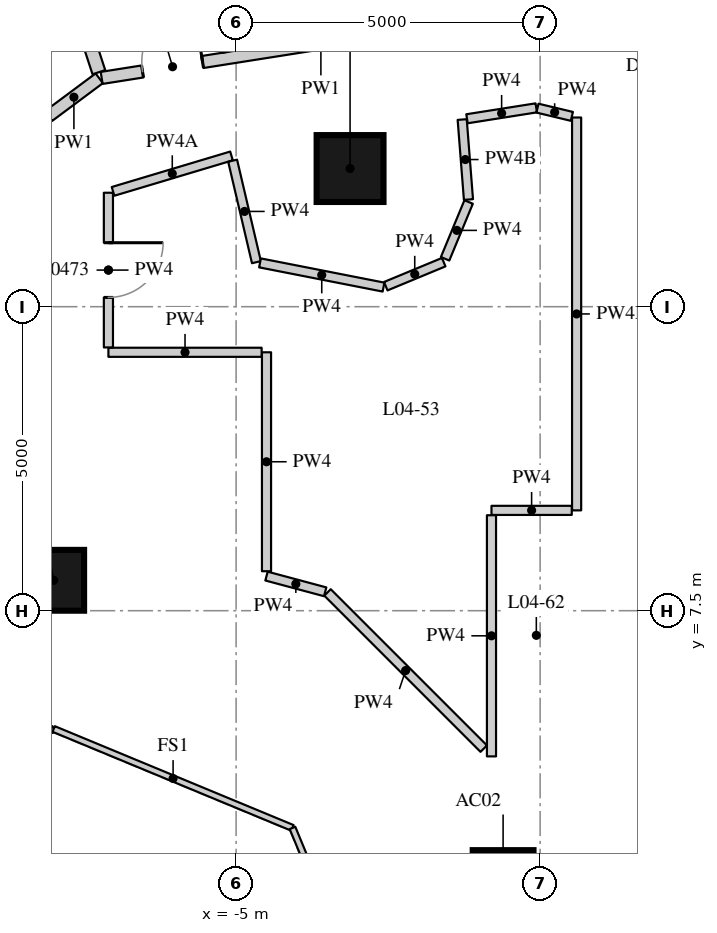
"""IFC4 building model, lengths in metres.
Left out: names, types, materials, properties, quantities, classifications, styles, units other than length and angle.
Written with IfcOpenShell. Run it as: python <this file> out.ifc"""

import sys

from ifc_helpers import new_model, si_unit, direction, frame, frame_2d, origin, origin_2d, place, context, subcontext, project, spatial, rectangle, extrude, element, fill, save


model = new_model("IFC4")
c1 = context("Model", 3, precision=1e-05, world=origin(), true_north=direction((0.0, 1.0)))
c2 = subcontext(c1, "Body", "Model", "MODEL_VIEW")
j1 = project(units=[si_unit("LENGTHUNIT", "METRE"), si_unit("PLANEANGLEUNIT", "RADIAN")], contexts=[c1])
p1 = place(None, origin())
s1 = spatial("IfcSite", under=j1, at=p1, CompositionType="ELEMENT")
p2 = place(p1, origin())
s2 = spatial("IfcBuilding", under=s1, at=p2, CompositionType="ELEMENT")
p3 = place(p2, frame((0.0, 0.0, 21.7)))
s3 = spatial("IfcBuildingStorey", under=s2, at=p3, CompositionType="ELEMENT", Elevation=21.7)
for number, where, z_axis, x_axis in (
    (1, (-0.609, 3.062, 0.0), (0.0, 0.0, 1.0), (1.0, 0.0, 0.0)),
    (2, (-8.0, 8.0, 0.0), (0.0, 0.0, 1.0), (1.0, 0.0, 0.0)),
):
    element("IfcColumn", number, at=place(p3, frame(where, z_axis=z_axis, x_axis=x_axis)), inside=s3, PredefinedType="COLUMN", context=c2, shape_type="SweptSolid", body=[
        extrude(rectangle(XDim=1.0, YDim=1.0, at=origin_2d()), origin(), (0.0, 0.0, 1.0), 3.3),
    ])
p4 = place(p3, frame((-3.126, 14.772, 0.0), z_axis=(0.0, 0.0, 1.0), x_axis=(1.0, 0.0, 0.0)))
e3 = element("IfcColumn", 3, at=p4, inside=s3, PredefinedType="COLUMN", context=c2, shape_type="SweptSolid", body=[
    extrude(rectangle(XDim=1.1, YDim=1.1, at=origin_2d()), origin(), (0.0, 0.0, 1.0), 3.3),
])
p5 = place(p3, frame((-8.084, 15.636, 0.0), z_axis=(0.0, 0.0, 1.0), x_axis=(0.802193962144, 0.597063520155, 0.0)))
e4 = element("IfcWall", 4, at=p5, inside=s3, PredefinedType="PARTITIONING", context=c2, shape_type="SweptSolid", body=[
    extrude(rectangle(XDim=1.039, YDim=0.2, at=frame_2d((0.52, 0.0))), origin(), (0.0, 0.0, 1.0), 3.02),
])
p6 = place(p3, frame((-7.211, 16.263, 0.0), z_axis=(0.0, 0.0, 1.0), x_axis=(0.987792503573, 0.155775382796, 0.0)))
e5 = element("IfcWall", 5, at=p6, inside=s3, PredefinedType="PARTITIONING", context=c2, shape_type="SweptSolid", body=[
    extrude(rectangle(XDim=7.3, YDim=0.2, at=frame_2d((3.65, 0.0))), origin(), (0.0, 0.0, 1.0), 3.02),
])
p7 = place(p6, frame((5.581, 0.0, 0.0)))
e6 = element("IfcOpeningElement", 6, at=p7, cuts=e5, PredefinedType="OPENING", context=c2, shape_type="SweptSolid", body=[
    extrude(rectangle(XDim=1.0, YDim=2.1, at=frame_2d((0.5, 1.05))), frame((0.0, 0.11, 0.0), z_axis=(0.0, -1.0, 0.0), x_axis=(1.0, 0.0, 0.0)), (0.0, 0.0, 1.0), 0.22),
])
p8 = place(p6, frame((0.68, 0.0, 0.0)))
e7 = element("IfcOpeningElement", 7, at=p8, cuts=e5, PredefinedType="OPENING", context=c2, shape_type="SweptSolid", body=[
    extrude(rectangle(XDim=1.0, YDim=2.1, at=frame_2d((0.5, 1.05))), frame((0.0, 0.11, 0.0), z_axis=(0.0, -1.0, 0.0), x_axis=(1.0, 0.0, 0.0)), (0.0, 0.0, 1.0), 0.22),
])
p9 = place(p3, frame((0.098, 17.377, 0.0), z_axis=(0.0, 0.0, 1.0), x_axis=(0.972602241469, -0.232475546864, 0.0)))
e8 = element("IfcWall", 8, at=p9, inside=s3, PredefinedType="PARTITIONING", context=c2, shape_type="SweptSolid", body=[
    extrude(rectangle(XDim=10.743, YDim=0.2, at=frame_2d((5.372, 0.0))), origin(), (0.0, 0.0, 1.0), 3.02),
])
p10 = place(p9, frame((4.242, 0.0, 0.0)))
e9 = element("IfcOpeningElement", 9, at=p10, cuts=e8, PredefinedType="OPENING", context=c2, shape_type="SweptSolid", body=[
    extrude(rectangle(XDim=1.0, YDim=2.1, at=frame_2d((0.5, 1.05))), frame((0.0, 0.11, 0.0), z_axis=(0.0, -1.0, 0.0), x_axis=(1.0, 0.0, 0.0)), (0.0, 0.0, 1.0), 0.22),
])
p11 = place(p9, frame((1.253, 0.0, 0.0)))
e10 = element("IfcOpeningElement", 10, at=p11, cuts=e8, PredefinedType="OPENING", context=c2, shape_type="SweptSolid", body=[
    extrude(rectangle(XDim=0.9, YDim=2.1, at=frame_2d((0.45, 1.05))), frame((0.0, 0.11, 0.0), z_axis=(0.0, -1.0, 0.0), x_axis=(1.0, 0.0, 0.0)), (0.0, 0.0, 1.0), 0.22),
])
p12 = place(p3, frame((0.6, 15.612, 0.0), z_axis=(0.0, 0.0, 1.0), x_axis=(0.0, -1.0, 0.0)))
e11 = element("IfcWall", 11, at=p12, inside=s3, PredefinedType="PARTITIONING", context=c2, shape_type="SweptSolid", body=[
    extrude(rectangle(XDim=6.462, YDim=0.15, at=frame_2d((3.231, 0.0))), origin(), (0.0, 0.0, 1.0), 2.47),
])
p13 = place(p3, frame((0.52, 9.15, 0.0), z_axis=(0.0, 0.0, 1.0), x_axis=(-1.0, 0.0, 0.0)))
e12 = element("IfcWall", 12, at=p13, inside=s3, PredefinedType="PARTITIONING", context=c2, shape_type="SweptSolid", body=[
    extrude(rectangle(XDim=1.32, YDim=0.15, at=frame_2d((0.66, 0.0))), origin(), (0.0, 0.0, 1.0), 3.02),
])
p14 = place(p3, frame((-0.8, 9.07, 0.0), z_axis=(0.0, 0.0, 1.0), x_axis=(0.0, -1.0, 0.0)))
e13 = element("IfcWall", 13, at=p14, inside=s3, PredefinedType="PARTITIONING", context=c2, shape_type="SweptSolid", body=[
    extrude(rectangle(XDim=3.966, YDim=0.15, at=frame_2d((1.983, 0.0))), origin(), (0.0, 0.0, 1.0), 3.02),
])
p15 = place(p3, frame((-0.927, 5.231, 0.0), z_axis=(0.0, 0.0, 1.0), x_axis=(-0.707106781187, 0.707106781187, 0.0)))
e14 = element("IfcWall", 14, at=p15, inside=s3, PredefinedType="PARTITIONING", context=c2, shape_type="SweptSolid", body=[
    extrude(rectangle(XDim=3.633, YDim=0.15, at=frame_2d((1.817, 0.0))), origin(), (0.0, 0.0, 1.0), 3.02),
])
p16 = place(p3, frame((-3.535, 7.811, 0.0), z_axis=(0.0, 0.0, 1.0), x_axis=(-0.965921867197, 0.258833820183, 0.0)))
e15 = element("IfcWall", 15, at=p16, inside=s3, PredefinedType="PARTITIONING", context=c2, shape_type="SweptSolid", body=[
    extrude(rectangle(XDim=0.999, YDim=0.15, at=frame_2d((0.5, 0.0))), origin(), (0.0, 0.0, 1.0), 3.02),
])
p17 = place(p3, frame((-4.5, 8.149, 0.0), z_axis=(0.0, 0.0, 1.0), x_axis=(0.0, 1.0, 0.0)))
e16 = element("IfcWall", 16, at=p17, inside=s3, PredefinedType="PARTITIONING", context=c2, shape_type="SweptSolid", body=[
    extrude(rectangle(XDim=3.601, YDim=0.15, at=frame_2d((1.8, 0.0))), origin(), (0.0, 0.0, 1.0), 3.02),
])
p18 = place(p3, frame((-4.58, 11.75, 0.0), z_axis=(0.0, 0.0, 1.0), x_axis=(-1.0, 0.0, 0.0)))
e17 = element("IfcWall", 17, at=p18, inside=s3, PredefinedType="PARTITIONING", context=c2, shape_type="SweptSolid", body=[
    extrude(rectangle(XDim=2.52, YDim=0.15, at=frame_2d((1.26, 0.0))), origin(), (0.0, 0.0, 1.0), 3.02),
])
p19 = place(p3, frame((-7.1, 11.83, 0.0), z_axis=(0.0, 0.0, 1.0), x_axis=(0.0, 1.0, 0.0)))
e18 = element("IfcWall", 18, at=p19, inside=s3, PredefinedType="PARTITIONING", context=c2, shape_type="SweptSolid", body=[
    extrude(rectangle(XDim=2.544, YDim=0.15, at=frame_2d((1.272, 0.0))), origin(), (0.0, 0.0, 1.0), 3.02),
])
p20 = place(p19, frame((0.822, 0.0, 0.0)))
e19 = element("IfcOpeningElement", 19, at=p20, cuts=e18, PredefinedType="OPENING", context=c2, shape_type="SweptSolid", body=[
    extrude(rectangle(XDim=0.9, YDim=2.1, at=frame_2d((0.45, 1.05))), frame((0.0, 0.085, 0.0), z_axis=(0.0, -1.0, 0.0), x_axis=(1.0, 0.0, 0.0)), (0.0, 0.0, 1.0), 0.17),
])
p21 = place(p3, frame((-7.024, 14.396, 0.0), z_axis=(0.0, 0.0, 1.0), x_axis=(0.958024310194, 0.286686974028, 0.0)))
e20 = element("IfcWall", 20, at=p21, inside=s3, PredefinedType="PARTITIONING", context=c2, shape_type="SweptSolid", body=[
    extrude(rectangle(XDim=2.034, YDim=0.15, at=frame_2d((1.017, 0.0))), origin(), (0.0, 0.0, 1.0), 2.57),
])
p22 = place(p3, frame((-5.057, 14.901, 0.0), z_axis=(0.0, 0.0, 1.0), x_axis=(0.228269361027, -0.973598017056, 0.0)))
e21 = element("IfcWall", 21, at=p22, inside=s3, PredefinedType="PARTITIONING", context=c2, shape_type="SweptSolid", body=[
    extrude(rectangle(XDim=1.714, YDim=0.15, at=frame_2d((0.857, 0.0))), origin(), (0.0, 0.0, 1.0), 3.02),
])
p23 = place(p3, frame((-4.607, 13.22, 0.0), z_axis=(0.0, 0.0, 1.0), x_axis=(0.981304142817, -0.192463449234, 0.0)))
e22 = element("IfcWall", 22, at=p23, inside=s3, PredefinedType="PARTITIONING", context=c2, shape_type="SweptSolid", body=[
    extrude(rectangle(XDim=2.07, YDim=0.15, at=frame_2d((1.035, 0.0))), origin(), (0.0, 0.0, 1.0), 3.02),
])
p24 = place(p3, frame((-2.539, 12.837, 0.0), z_axis=(0.0, 0.0, 1.0), x_axis=(0.923768662954, 0.382950985565, 0.0)))
e23 = element("IfcWall", 23, at=p24, inside=s3, PredefinedType="PARTITIONING", context=c2, shape_type="SweptSolid", body=[
    extrude(rectangle(XDim=1.031, YDim=0.15, at=frame_2d((0.516, 0.0))), origin(), (0.0, 0.0, 1.0), 3.02),
])
p25 = place(p3, frame((-1.563, 13.288, 0.0), z_axis=(0.0, 0.0, 1.0), x_axis=(0.38284922736, 0.923810840546, 0.0)))
e24 = element("IfcWall", 24, at=p25, inside=s3, PredefinedType="PARTITIONING", context=c2, shape_type="SweptSolid", body=[
    extrude(rectangle(XDim=1.011, YDim=0.15, at=frame_2d((0.506, 0.0))), origin(), (0.0, 0.0, 1.0), 3.02),
])
p26 = place(p3, frame((-1.179, 14.262, 0.0), z_axis=(0.0, 0.0, 1.0), x_axis=(-0.078054271799, 0.996949111366, 0.0)))
e25 = element("IfcWall", 25, at=p26, inside=s3, PredefinedType="PARTITIONING", context=c2, shape_type="SweptSolid", body=[
    extrude(rectangle(XDim=1.32, YDim=0.15, at=frame_2d((0.66, 0.0))), origin(), (0.0, 0.0, 1.0), 2.47),
])
p27 = place(p3, frame((-1.203, 15.591, 0.0), z_axis=(0.0, 0.0, 1.0), x_axis=(0.987814418255, 0.155636355288, 0.0)))
e26 = element("IfcWall", 26, at=p27, inside=s3, PredefinedType="PARTITIONING", context=c2, shape_type="SweptSolid", body=[
    extrude(rectangle(XDim=1.153, YDim=0.15, at=frame_2d((0.577, 0.0))), origin(), (0.0, 0.0, 1.0), 3.02),
])
p28 = place(p3, frame((-0.044, 15.766, 0.0), z_axis=(0.0, 0.0, 1.0), x_axis=(0.972535568527, -0.232754308121, 0.0)))
e27 = element("IfcWall", 27, at=p28, inside=s3, PredefinedType="PARTITIONING", context=c2, shape_type="SweptSolid", body=[
    extrude(rectangle(XDim=0.582, YDim=0.15, at=frame_2d((0.291, 0.0))), origin(), (0.0, 0.0, 1.0), 3.02),
])
p29 = place(p3, frame((-9.429, 23.014, 0.0), z_axis=(0.0, 0.0, 1.0), x_axis=(0.310239117306, -0.950658555998, 0.0)))
e28 = element("IfcWall", 28, at=p29, inside=s3, PredefinedType="PARTITIONING", context=c2, shape_type="SweptSolid", body=[
    extrude(rectangle(XDim=7.003, YDim=0.22, at=frame_2d((3.501, 0.0))), origin(), (0.0, 0.0, 1.0), 3.02),
])
p30 = place(p3, frame((-5.181, 16.684, 0.0), z_axis=(0.0, 0.0, 1.0), x_axis=(-0.156077517275, 0.987744809453, 0.0)))
e29 = element("IfcWall", 29, at=p30, inside=s3, PredefinedType="PARTITIONING", context=c2, shape_type="SweptSolid", body=[
    extrude(rectangle(XDim=2.399, YDim=0.12, at=frame_2d((1.2, 0.0))), origin(), (0.0, 0.0, 1.0), 3.02),
])
for number, where, z_axis, x_axis in (
    (30, (-11.927, 3.927, 0.0), (0.0, 0.0, 1.0), (0.924, 0.383, 0.0)),
    (31, (-8.0, 5.554, 0.0), (0.0, 0.0, 1.0), (0.924, -0.383, 0.0)),
    (32, (-4.073, 3.927, 0.0), (0.0, 0.0, 1.0), (0.383, -0.924, 0.0)),
):
    element("IfcWall", number, at=place(p3, frame(where, z_axis=z_axis, x_axis=x_axis)), inside=s3, PredefinedType="PARTITIONING", context=c2, shape_type="SweptSolid", body=[
        extrude(rectangle(XDim=4.251, YDim=0.1, at=frame_2d((2.125, 0.0))), origin(), (0.0, 0.0, 1.0), 3.02),
    ])
p31 = place(p8, origin())
e33 = element("IfcDoor", 33, at=p31, inside=s3, OperationType="SINGLE_SWING_RIGHT", PredefinedType="DOOR", context=c2, shape_type="SweptSolid", body=[
    extrude(rectangle(XDim=1.0, YDim=2.1, at=frame_2d((0.5, 1.05))), frame((0.0, 0.025, 0.0), z_axis=(0.0, -1.0, 0.0), x_axis=(1.0, 0.0, 0.0)), (0.0, 0.0, 1.0), 0.05),
])
fill(e7, e33)
p32 = place(p20, origin())
e34 = element("IfcDoor", 34, at=p32, inside=s3, OperationType="SINGLE_SWING_LEFT", PredefinedType="DOOR", context=c2, shape_type="SweptSolid", body=[
    extrude(rectangle(XDim=0.9, YDim=2.1, at=frame_2d((0.45, 1.05))), frame((0.0, 0.025, 0.0), z_axis=(0.0, -1.0, 0.0), x_axis=(1.0, 0.0, 0.0)), (0.0, 0.0, 1.0), 0.05),
])
fill(e19, e34)
save(model, sys.argv[1])
